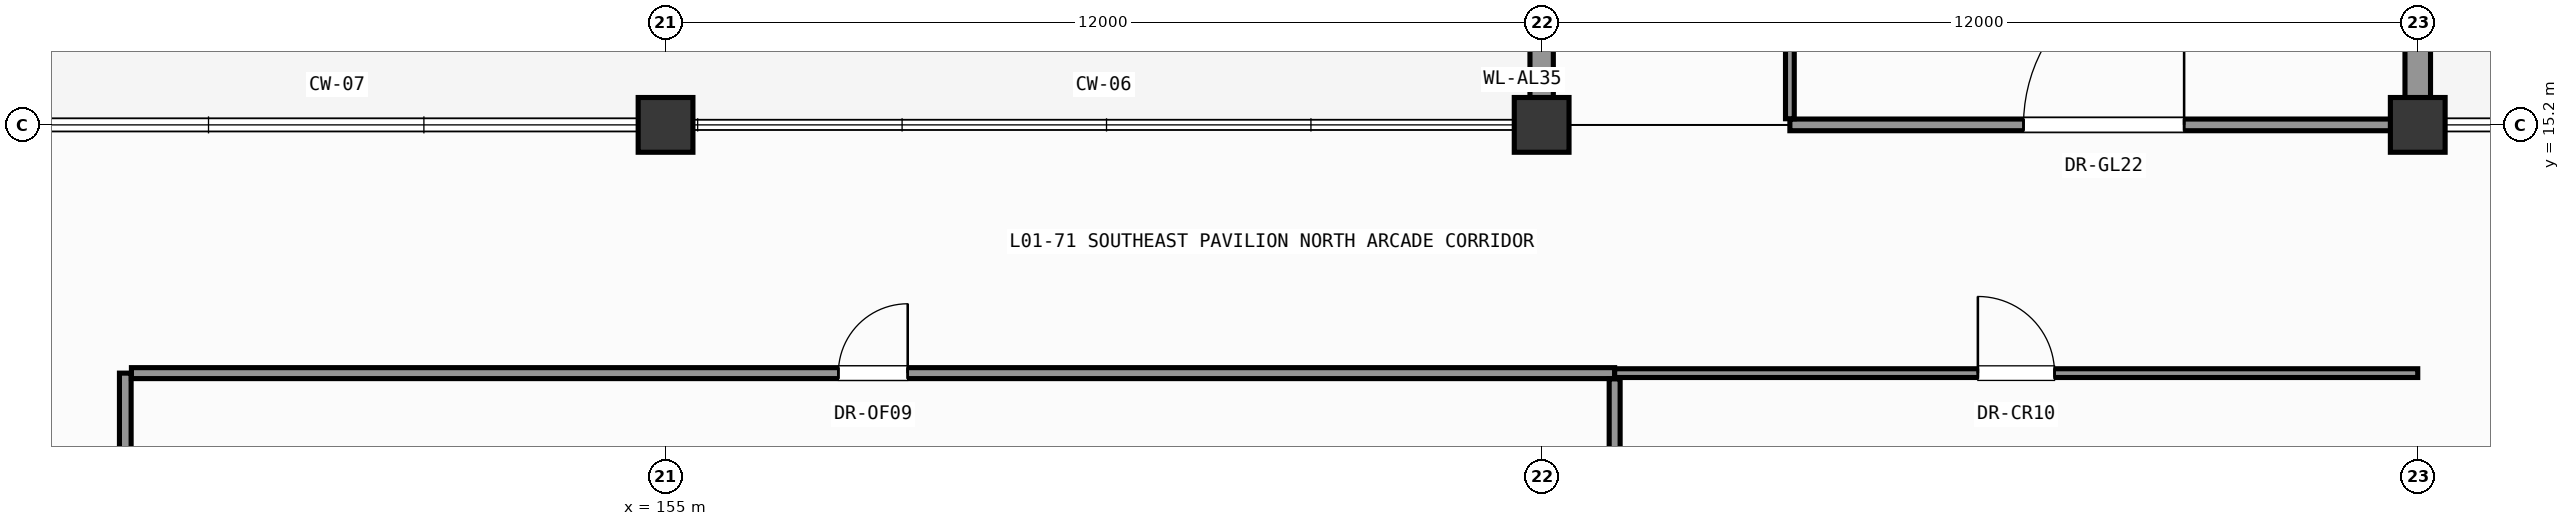
"""IFC4 building model, lengths in metres.
Left out: names, types, materials, properties, quantities, classifications, styles, units other than length and angle.
Written with IfcOpenShell. Run it as: python <this file> out.ifc"""

import sys

from ifc_helpers import new_model, si_unit, direction, frame, frame_2d, origin, origin_2d, place, context, subcontext, project, spatial, rectangle, circle, extrude, element, fill, save


model = new_model("IFC4")
c1 = context("Model", 3, precision=1e-05, world=origin(), true_north=direction((0.0, 1.0)))
c2 = subcontext(c1, "Body", "Model", "MODEL_VIEW")
j1 = project(units=[si_unit("LENGTHUNIT", "METRE"), si_unit("PLANEANGLEUNIT", "RADIAN")], contexts=[c1])
p1 = place(None, origin())
s1 = spatial("IfcSite", under=j1, at=p1, CompositionType="ELEMENT")
p2 = place(p1, origin())
s2 = spatial("IfcBuilding", under=s1, at=p2, CompositionType="ELEMENT")
p3 = place(p2, origin())
s3 = spatial("IfcBuildingStorey", under=s2, at=p3, CompositionType="ELEMENT", Elevation=0.0)
for number, where, z_axis, x_axis in (
    (1, (155.0, 15.2, 0.0), (0.0, 0.0, 1.0), (1.0, 0.0, 0.0)),
    (2, (167.0, 15.2, 0.0), (0.0, 0.0, 1.0), (1.0, 0.0, 0.0)),
    (3, (179.0, 15.2, 0.0), (0.0, 0.0, 1.0), (1.0, 0.0, 0.0)),
):
    element("IfcColumn", number, at=place(p3, frame(where, z_axis=z_axis, x_axis=x_axis)), inside=s3, PredefinedType="COLUMN", context=c2, shape_type="SweptSolid", body=[
        extrude(circle(Radius=0.375, at=origin_2d()), origin(), (0.0, 0.0, 1.0), 7.8),
    ])
p4 = place(p3, frame((167.0, 15.2, 0.0), z_axis=(0.0, 0.0, 1.0), x_axis=(0.0, 1.0, 0.0)))
e4 = element("IfcWall", 4, at=p4, inside=s3, PredefinedType="SOLIDWALL", context=c2, shape_type="SweptSolid", body=[
    extrude(rectangle(XDim=7.6, YDim=0.32, at=frame_2d((3.8, 0.0))), origin(), (0.0, 0.0, 1.0), 7.235),
])
p5 = place(p4, frame((1.783, 0.0, 0.95)))
e5 = element("IfcOpeningElement", 5, at=p5, cuts=e4, PredefinedType="OPENING", context=c2, shape_type="SweptSolid", body=[
    extrude(rectangle(XDim=1.5, YDim=2.4, at=frame_2d((0.75, 1.2))), frame((0.0, 0.17, 0.0), z_axis=(0.0, -1.0, 0.0), x_axis=(1.0, 0.0, 0.0)), (0.0, 0.0, 1.0), 0.34),
])
p6 = place(p4, frame((4.317, 0.0, 0.95)))
e6 = element("IfcOpeningElement", 6, at=p6, cuts=e4, PredefinedType="OPENING", context=c2, shape_type="SweptSolid", body=[
    extrude(rectangle(XDim=1.5, YDim=2.4, at=frame_2d((0.75, 1.2))), frame((0.0, 0.17, 0.0), z_axis=(0.0, -1.0, 0.0), x_axis=(1.0, 0.0, 0.0)), (0.0, 0.0, 1.0), 0.34),
])
p7 = place(p3, frame((166.836, 15.2, 0.0), z_axis=(0.0, 0.0, 1.0), x_axis=(-1.0, 0.0, 0.0)))
e7 = element("IfcWall", 7, at=p7, inside=s3, PredefinedType="SOLIDWALL", context=c2, shape_type="SweptSolid", body=[
    extrude(rectangle(XDim=0.196, YDim=0.35, at=frame_2d((0.098, 0.0))), origin(), (0.0, 0.0, 1.0), 7.54),
])
p8 = place(p3, frame((155.36, 15.2, 0.0), z_axis=(0.0, 0.0, 1.0), x_axis=(-1.0, 0.0, 0.0)))
e8 = element("IfcWall", 8, at=p8, inside=s3, PredefinedType="SOLIDWALL", context=c2, shape_type="SweptSolid", body=[
    extrude(rectangle(XDim=0.36, YDim=0.35, at=frame_2d((0.18, 0.0))), origin(), (0.0, 0.0, 1.0), 6.925),
])
p9 = place(p3, frame((155.0, 15.2, 0.0), z_axis=(0.0, 0.0, 1.0), x_axis=(-1.0, 0.0, 0.0)))
e9 = element("IfcWall", 9, at=p9, inside=s3, PredefinedType="SOLIDWALL", context=c2, shape_type="SweptSolid", body=[
    extrude(rectangle(XDim=0.36, YDim=0.35, at=frame_2d((0.18, 0.0))), origin(), (0.0, 0.0, 1.0), 7.125),
])
p10 = place(p3, frame((179.36, 15.2, 0.0), z_axis=(0.0, 0.0, 1.0), x_axis=(-1.0, 0.0, 0.0)))
e10 = element("IfcWall", 10, at=p10, inside=s3, PredefinedType="SOLIDWALL", context=c2, shape_type="SweptSolid", body=[
    extrude(rectangle(XDim=0.36, YDim=0.35, at=frame_2d((0.18, 0.0))), origin(), (0.0, 0.0, 1.0), 6.925),
])
p11 = place(p3, frame((179.0, 22.8, 0.0), z_axis=(0.0, 0.0, 1.0), x_axis=(0.0, -1.0, 0.0)))
e11 = element("IfcWall", 11, at=p11, inside=s3, PredefinedType="SOLIDWALL", context=c2, shape_type="SweptSolid", body=[
    extrude(rectangle(XDim=7.421, YDim=0.35, at=frame_2d((3.71, 0.0))), origin(), (0.0, 0.0, 1.0), 7.025),
])
p12 = place(p11, frame((1.424, 0.0, 0.95)))
e12 = element("IfcOpeningElement", 12, at=p12, cuts=e11, PredefinedType="OPENING", context=c2, shape_type="SweptSolid", body=[
    extrude(rectangle(XDim=2.1, YDim=2.8, at=frame_2d((1.05, 1.4))), frame((0.0, 0.185, 0.0), z_axis=(0.0, -1.0, 0.0), x_axis=(1.0, 0.0, 0.0)), (0.0, 0.0, 1.0), 0.37),
])
p13 = place(p11, frame((3.897, 0.0, 0.95)))
e13 = element("IfcOpeningElement", 13, at=p13, cuts=e11, PredefinedType="OPENING", context=c2, shape_type="SweptSolid", body=[
    extrude(rectangle(XDim=2.1, YDim=2.8, at=frame_2d((1.05, 1.4))), frame((0.0, 0.185, 0.0), z_axis=(0.0, -1.0, 0.0), x_axis=(1.0, 0.0, 0.0)), (0.0, 0.0, 1.0), 0.37),
])
p14 = place(p3, frame((147.6, 0.154, 0.0), z_axis=(0.0, 0.0, 1.0), x_axis=(0.0, 1.0, 0.0)))
e14 = element("IfcWall", 14, at=p14, inside=s3, PredefinedType="PARTITIONING", context=c2, shape_type="SweptSolid", body=[
    extrude(rectangle(XDim=11.646, YDim=0.16, at=frame_2d((5.823, 0.0))), origin(), (0.0, 0.0, 1.0), 7.54),
])
p15 = place(p14, frame((5.323, 0.0, 0.0)))
e15 = element("IfcOpeningElement", 15, at=p15, cuts=e14, PredefinedType="OPENING", context=c2, shape_type="SweptSolid", body=[
    extrude(rectangle(XDim=1.0, YDim=2.15, at=frame_2d((0.5, 1.075))), frame((0.0, 0.09, 0.0), z_axis=(0.0, -1.0, 0.0), x_axis=(1.0, 0.0, 0.0)), (0.0, 0.0, 1.0), 0.18),
])
p16 = place(p3, frame((147.684, 11.8, 0.0), z_axis=(0.0, 0.0, 1.0), x_axis=(1.0, 0.0, 0.0)))
e16 = element("IfcWall", 16, at=p16, inside=s3, PredefinedType="PARTITIONING", context=c2, shape_type="SweptSolid", body=[
    extrude(rectangle(XDim=20.316, YDim=0.15, at=frame_2d((10.158, 0.0))), origin(), (0.0, 0.0, 1.0), 7.54),
])
p17 = place(p16, frame((9.683, 0.0, 0.0)))
e17 = element("IfcOpeningElement", 17, at=p17, cuts=e16, PredefinedType="OPENING", context=c2, shape_type="SweptSolid", body=[
    extrude(rectangle(XDim=0.95, YDim=2.1, at=frame_2d((0.475, 1.05))), frame((0.0, 0.085, 0.0), z_axis=(0.0, -1.0, 0.0), x_axis=(1.0, 0.0, 0.0)), (0.0, 0.0, 1.0), 0.17),
])
p18 = place(p3, frame((168.0, 11.8, 0.0), z_axis=(0.0, 0.0, 1.0), x_axis=(1.0, 0.0, 0.0)))
e18 = element("IfcWall", 18, at=p18, inside=s3, PredefinedType="PARTITIONING", context=c2, shape_type="SweptSolid", body=[
    extrude(rectangle(XDim=11.0, YDim=0.12, at=frame_2d((5.5, 0.0))), origin(), (0.0, 0.0, 1.0), 7.54),
])
p19 = place(p18, frame((4.975, 0.0, 0.0)))
e19 = element("IfcOpeningElement", 19, at=p19, cuts=e18, PredefinedType="OPENING", context=c2, shape_type="SweptSolid", body=[
    extrude(rectangle(XDim=1.05, YDim=2.2, at=frame_2d((0.525, 1.1))), frame((0.0, 0.07, 0.0), z_axis=(0.0, -1.0, 0.0), x_axis=(1.0, 0.0, 0.0)), (0.0, 0.0, 1.0), 0.14),
])
p20 = place(p3, frame((170.4, 15.2, 0.0), z_axis=(0.0, 0.0, 1.0), x_axis=(1.0, 0.0, 0.0)))
e20 = element("IfcWall", 20, at=p20, inside=s3, PredefinedType="PARTITIONING", context=c2, shape_type="SweptSolid", body=[
    extrude(rectangle(XDim=8.6, YDim=0.16, at=frame_2d((4.3, 0.0))), origin(), (0.0, 0.0, 1.0), 6.925),
])
p21 = place(p20, frame((3.2, 0.0, 0.0)))
e21 = element("IfcOpeningElement", 21, at=p21, cuts=e20, PredefinedType="OPENING", context=c2, shape_type="SweptSolid", body=[
    extrude(rectangle(XDim=2.2, YDim=2.6, at=frame_2d((1.1, 1.3))), frame((0.0, 0.09, 0.0), z_axis=(0.0, -1.0, 0.0), x_axis=(1.0, 0.0, 0.0)), (0.0, 0.0, 1.0), 0.18),
])
p22 = place(p3, frame((168.0, 0.179, 0.0), z_axis=(0.0, 0.0, 1.0), x_axis=(0.0, 1.0, 0.0)))
e22 = element("IfcWall", 22, at=p22, inside=s3, PredefinedType="PARTITIONING", context=c2, shape_type="SweptSolid", body=[
    extrude(rectangle(XDim=11.542, YDim=0.15, at=frame_2d((5.771, 0.0))), origin(), (0.0, 0.0, 1.0), 7.54),
])
p23 = place(p22, frame((5.296, 0.0, 0.0)))
e23 = element("IfcOpeningElement", 23, at=p23, cuts=e22, PredefinedType="OPENING", context=c2, shape_type="SweptSolid", body=[
    extrude(rectangle(XDim=0.95, YDim=2.1, at=frame_2d((0.475, 1.05))), frame((0.0, 0.085, 0.0), z_axis=(0.0, -1.0, 0.0), x_axis=(1.0, 0.0, 0.0)), (0.0, 0.0, 1.0), 0.17),
])
p24 = place(p3, frame((170.4, 15.284, 0.0), z_axis=(0.0, 0.0, 1.0), x_axis=(0.0, 1.0, 0.0)))
e24 = element("IfcWall", 24, at=p24, inside=s3, PredefinedType="PARTITIONING", context=c2, shape_type="SweptSolid", body=[
    extrude(rectangle(XDim=37.316, YDim=0.12, at=frame_2d((18.658, 0.0))), origin(), (0.0, 0.0, 1.0), 7.54),
])
p25 = place(p24, frame((17.558, 0.0, 0.0)))
e25 = element("IfcOpeningElement", 25, at=p25, cuts=e24, PredefinedType="OPENING", context=c2, shape_type="SweptSolid", body=[
    extrude(rectangle(XDim=2.2, YDim=2.6, at=frame_2d((1.1, 1.3))), frame((0.0, 0.07, 0.0), z_axis=(0.0, -1.0, 0.0), x_axis=(1.0, 0.0, 0.0)), (0.0, 0.0, 1.0), 0.14),
])
p26 = place(p17, origin())
e26 = element("IfcDoor", 26, at=p26, inside=s3, OperationType="SINGLE_SWING_RIGHT", PredefinedType="DOOR", context=c2, shape_type="SweptSolid", body=[
    extrude(rectangle(XDim=0.95, YDim=2.1, at=frame_2d((0.475, 1.05))), frame((0.0, 0.025, 0.0), z_axis=(0.0, -1.0, 0.0), x_axis=(1.0, 0.0, 0.0)), (0.0, 0.0, 1.0), 0.05),
])
fill(e17, e26)
p27 = place(p19, origin())
e27 = element("IfcDoor", 27, at=p27, inside=s3, OperationType="SINGLE_SWING_LEFT", PredefinedType="DOOR", context=c2, shape_type="SweptSolid", body=[
    extrude(rectangle(XDim=1.05, YDim=2.2, at=frame_2d((0.525, 1.1))), frame((0.0, 0.025, 0.0), z_axis=(0.0, -1.0, 0.0), x_axis=(1.0, 0.0, 0.0)), (0.0, 0.0, 1.0), 0.05),
])
fill(e19, e27)
p28 = place(p21, origin())
e28 = element("IfcDoor", 28, at=p28, inside=s3, OperationType="SINGLE_SWING_RIGHT", PredefinedType="DOOR", context=c2, shape_type="SweptSolid", body=[
    extrude(rectangle(XDim=2.2, YDim=2.6, at=frame_2d((1.1, 1.3))), frame((0.0, 0.025, 0.0), z_axis=(0.0, -1.0, 0.0), x_axis=(1.0, 0.0, 0.0)), (0.0, 0.0, 1.0), 0.05),
])
fill(e21, e28)
save(model, sys.argv[1])
